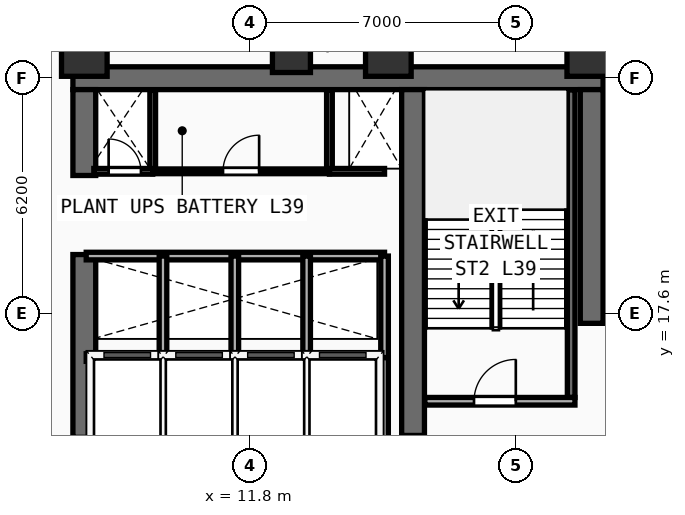
"""IFC4 building model, lengths in metres.
Left out: names, types, materials, properties, quantities, classifications, styles, units other than length and angle.
Written with IfcOpenShell. Run it as: python <this file> out.ifc"""

import sys

from ifc_helpers import new_model, si_unit, direction, frame, frame_2d, origin, origin_2d, place, context, subcontext, project, spatial, rectangle, extrude, element, fill, save


model = new_model("IFC4")
c1 = context("Model", 3, precision=1e-05, world=origin(), true_north=direction((0.0, 1.0)))
c2 = subcontext(c1, "Body", "Model", "MODEL_VIEW")
j1 = project(units=[si_unit("LENGTHUNIT", "METRE"), si_unit("PLANEANGLEUNIT", "RADIAN")], contexts=[c1])
p1 = place(None, origin())
s1 = spatial("IfcSite", under=j1, at=p1, CompositionType="ELEMENT")
p2 = place(p1, origin())
s2 = spatial("IfcBuilding", under=s1, at=p2, CompositionType="ELEMENT")
p3 = place(p2, frame((0.0, 0.0, 153.8)))
s3 = spatial("IfcBuildingStorey", under=s2, at=p3, CompositionType="ELEMENT", Elevation=153.8)
p4 = place(p3, frame((7.15, 23.8, 0.0), z_axis=(0.0, 0.0, 1.0), x_axis=(1.0, 0.0, 0.0)))
e1 = element("IfcWall", 1, at=p4, inside=s3, PredefinedType="SHEAR", context=c2, shape_type="SweptSolid", body=[
    extrude(rectangle(XDim=13.95, YDim=0.6, at=frame_2d((6.975, 0.0))), origin(), (0.0, 0.0, 1.0), 3.56),
])
p5 = place(p3, frame((7.45, 14.35, 0.0), z_axis=(0.0, 0.0, 1.0), x_axis=(0.0, 1.0, 0.0)))
e2 = element("IfcWall", 2, at=p5, inside=s3, PredefinedType="SHEAR", context=c2, shape_type="SweptSolid", body=[
    extrude(rectangle(XDim=4.81, YDim=0.6, at=frame_2d((2.405, 0.0))), origin(), (0.0, 0.0, 1.0), 3.56),
])
p6 = place(p3, frame((7.45, 21.24, 0.0), z_axis=(0.0, 0.0, 1.0), x_axis=(0.0, 1.0, 0.0)))
e3 = element("IfcWall", 3, at=p6, inside=s3, PredefinedType="SHEAR", context=c2, shape_type="SweptSolid", body=[
    extrude(rectangle(XDim=2.26, YDim=0.6, at=frame_2d((1.13, 0.0))), origin(), (0.0, 0.0, 1.0), 3.56),
])
p7 = place(p3, frame((20.8, 17.35, 0.0), z_axis=(0.0, 0.0, 1.0), x_axis=(0.0, 1.0, 0.0)))
e4 = element("IfcWall", 4, at=p7, inside=s3, PredefinedType="SHEAR", context=c2, shape_type="SweptSolid", body=[
    extrude(rectangle(XDim=6.15, YDim=0.6, at=frame_2d((3.075, 0.0))), origin(), (0.0, 0.0, 1.0), 3.56),
])
p8 = place(p3, frame((16.1, 14.4, 0.0), z_axis=(0.0, 0.0, 1.0), x_axis=(0.0, 1.0, 0.0)))
e5 = element("IfcWall", 5, at=p8, inside=s3, PredefinedType="SHEAR", context=c2, shape_type="SweptSolid", body=[
    extrude(rectangle(XDim=9.1, YDim=0.6, at=frame_2d((4.55, 0.0))), origin(), (0.0, 0.0, 1.0), 3.56),
])
for number, where, z_axis, x_axis in (
    (6, (7.45, 24.45, 0.0), (0.0, 0.0, 1.0), (1.0, 0.0, 0.0)),
    (7, (15.45, 24.45, 0.0), (0.0, 0.0, 1.0), (1.0, 0.0, 0.0)),
    (8, (20.75, 24.45, 0.0), (0.0, 0.0, 1.0), (1.0, 0.0, 0.0)),
):
    element("IfcColumn", number, at=place(p3, frame(where, z_axis=z_axis, x_axis=x_axis)), inside=s3, PredefinedType="COLUMN", context=c2, shape_type="SweptSolid", body=[
        extrude(rectangle(XDim=1.2, YDim=1.2, at=origin_2d()), origin(), (0.0, 0.0, 1.0), 3.56),
    ])
p9 = place(p3, frame((12.9, 24.45, 0.0), z_axis=(0.0, 0.0, 1.0), x_axis=(1.0, 0.0, 0.0)))
e9 = element("IfcColumn", 9, at=p9, inside=s3, PredefinedType="COLUMN", context=c2, shape_type="SweptSolid", body=[
    extrude(rectangle(XDim=1.0, YDim=1.0, at=origin_2d()), origin(), (0.0, 0.0, 1.0), 3.56),
])
p10 = place(p3, frame((20.26, 15.4, 0.0), z_axis=(0.0, 0.0, 1.0), x_axis=(0.0, 1.0, 0.0)))
e10 = element("IfcWall", 10, at=p10, inside=s3, PredefinedType="SHEAR", context=c2, shape_type="SweptSolid", body=[
    extrude(rectangle(XDim=8.09, YDim=0.2, at=frame_2d((4.045, 0.0))), origin(), (0.0, 0.0, 1.0), 3.56),
])
p11 = place(p3, frame((16.41, 15.3, 0.0), z_axis=(0.0, 0.0, 1.0), x_axis=(1.0, 0.0, 0.0)))
e11 = element("IfcWall", 11, at=p11, inside=s3, PredefinedType="PARTITIONING", context=c2, shape_type="SweptSolid", body=[
    extrude(rectangle(XDim=3.95, YDim=0.2, at=frame_2d((1.975, 0.0))), origin(), (0.0, 0.0, 1.0), 3.56),
])
p12 = place(p11, frame((1.294, 0.0, 0.0)))
e12 = element("IfcOpeningElement", 12, at=p12, cuts=e11, PredefinedType="OPENING", context=c2, shape_type="SweptSolid", body=[
    extrude(rectangle(XDim=1.1, YDim=2.2, at=frame_2d((0.55, 1.1))), frame((0.0, 0.11, 0.0), z_axis=(0.0, -1.0, 0.0), x_axis=(1.0, 0.0, 0.0)), (0.0, 0.0, 1.0), 0.22),
])
p13 = place(p3, frame((7.5, 16.45, 0.0), z_axis=(0.0, 0.0, 1.0), x_axis=(1.0, 0.0, 0.0)))
e13 = element("IfcWall", 13, at=p13, inside=s3, PredefinedType="PARTITIONING", context=c2, shape_type="SweptSolid", body=[
    extrude(rectangle(XDim=7.85, YDim=0.2, at=frame_2d((3.925, 0.0))), origin(), (0.0, 0.0, 1.0), 3.56),
])
for number, where, z_axis, x_axis in (
    (14, (15.35, 14.22, 0.0), (0.0, 0.0, 1.0), (0.0, 1.0, 0.0)),
    (15, (9.52, 14.22, 0.0), (0.0, 0.0, 1.0), (0.0, 1.0, 0.0)),
    (16, (11.41, 14.22, 0.0), (0.0, 0.0, 1.0), (0.0, 1.0, 0.0)),
    (17, (13.3, 14.22, 0.0), (0.0, 0.0, 1.0), (0.0, 1.0, 0.0)),
):
    element("IfcWall", number, at=place(p3, frame(where, z_axis=z_axis, x_axis=x_axis)), inside=s3, PredefinedType="PARTITIONING", context=c2, shape_type="SweptSolid", body=[
        extrude(rectangle(XDim=2.23, YDim=0.2, at=frame_2d((1.115, 0.0))), origin(), (0.0, 0.0, 1.0), 3.56),
    ])
p14 = place(p3, frame((7.5, 19.12, 0.0), z_axis=(0.0, 0.0, 1.0), x_axis=(1.0, 0.0, 0.0)))
e18 = element("IfcWall", 18, at=p14, inside=s3, PredefinedType="PARTITIONING", context=c2, shape_type="SweptSolid", body=[
    extrude(rectangle(XDim=7.85, YDim=0.2, at=frame_2d((3.925, 0.0))), origin(), (0.0, 0.0, 1.0), 3.56),
])
for number, where, z_axis, x_axis in (
    (19, (15.35, 16.45, 0.0), (0.0, 0.0, 1.0), (0.0, 1.0, 0.0)),
    (20, (9.52, 16.45, 0.0), (0.0, 0.0, 1.0), (0.0, 1.0, 0.0)),
    (21, (11.41, 16.45, 0.0), (0.0, 0.0, 1.0), (0.0, 1.0, 0.0)),
    (22, (13.3, 16.45, 0.0), (0.0, 0.0, 1.0), (0.0, 1.0, 0.0)),
):
    element("IfcWall", number, at=place(p3, frame(where, z_axis=z_axis, x_axis=x_axis)), inside=s3, PredefinedType="PARTITIONING", context=c2, shape_type="SweptSolid", body=[
        extrude(rectangle(XDim=2.67, YDim=0.2, at=frame_2d((1.335, 0.0))), origin(), (0.0, 0.0, 1.0), 3.56),
    ])
for number, where, z_axis, x_axis in (
    (23, (9.25, 21.35, 0.0), (0.0, 0.0, 1.0), (0.0, 1.0, 0.0)),
    (24, (13.9, 21.35, 0.0), (0.0, 0.0, 1.0), (0.0, 1.0, 0.0)),
):
    element("IfcWall", number, at=place(p3, frame(where, z_axis=z_axis, x_axis=x_axis)), inside=s3, PredefinedType="PARTITIONING", context=c2, shape_type="SweptSolid", body=[
        extrude(rectangle(XDim=2.13, YDim=0.15, at=frame_2d((1.065, 0.0))), origin(), (0.0, 0.0, 1.0), 3.56),
    ])
p15 = place(p3, frame((7.7, 21.35, 0.0), z_axis=(0.0, 0.0, 1.0), x_axis=(1.0, 0.0, 0.0)))
e25 = element("IfcWall", 25, at=p15, inside=s3, PredefinedType="PARTITIONING", context=c2, shape_type="SweptSolid", body=[
    extrude(rectangle(XDim=1.55, YDim=0.15, at=frame_2d((0.775, 0.0))), origin(), (0.0, 0.0, 1.0), 3.56),
])
p16 = place(p15, frame((0.39, 0.0, 0.0)))
e26 = element("IfcOpeningElement", 26, at=p16, cuts=e25, PredefinedType="OPENING", context=c2, shape_type="SweptSolid", body=[
    extrude(rectangle(XDim=0.85, YDim=2.15, at=frame_2d((0.425, 1.075))), frame((0.0, 0.085, 0.0), z_axis=(0.0, -1.0, 0.0), x_axis=(1.0, 0.0, 0.0)), (0.0, 0.0, 1.0), 0.17),
])
p17 = place(p3, frame((13.9, 21.35, 0.0), z_axis=(0.0, 0.0, 1.0), x_axis=(1.0, 0.0, 0.0)))
e27 = element("IfcWall", 27, at=p17, inside=s3, PredefinedType="PARTITIONING", context=c2, shape_type="SweptSolid", body=[
    extrude(rectangle(XDim=1.45, YDim=0.15, at=frame_2d((0.725, 0.0))), origin(), (0.0, 0.0, 1.0), 3.56),
])
p18 = place(p3, frame((9.25, 21.35, 0.0), z_axis=(0.0, 0.0, 1.0), x_axis=(1.0, 0.0, 0.0)))
e28 = element("IfcWall", 28, at=p18, inside=s3, PredefinedType="PARTITIONING", context=c2, shape_type="SweptSolid", body=[
    extrude(rectangle(XDim=4.65, YDim=0.125, at=frame_2d((2.325, 0.0))), origin(), (0.0, 0.0, 1.0), 3.56),
])
p19 = place(p18, frame((1.85, 0.0, 0.0)))
e29 = element("IfcOpeningElement", 29, at=p19, cuts=e28, PredefinedType="OPENING", context=c2, shape_type="SweptSolid", body=[
    extrude(rectangle(XDim=0.95, YDim=2.15, at=frame_2d((0.475, 1.075))), frame((0.0, 0.073, 0.0), z_axis=(0.0, -1.0, 0.0), x_axis=(1.0, 0.0, 0.0)), (0.0, 0.0, 1.0), 0.145),
])
p20 = place(p12, origin())
e30 = element("IfcDoor", 30, at=p20, inside=s3, OperationType="SINGLE_SWING_RIGHT", PredefinedType="DOOR", context=c2, shape_type="SweptSolid", body=[
    extrude(rectangle(XDim=1.1, YDim=2.2, at=frame_2d((0.55, 1.1))), frame((0.0, 0.025, 0.0), z_axis=(0.0, -1.0, 0.0), x_axis=(1.0, 0.0, 0.0)), (0.0, 0.0, 1.0), 0.05),
])
fill(e12, e30)
p21 = place(p16, origin())
e31 = element("IfcDoor", 31, at=p21, inside=s3, OperationType="SINGLE_SWING_LEFT", PredefinedType="DOOR", context=c2, shape_type="SweptSolid", body=[
    extrude(rectangle(XDim=0.85, YDim=2.15, at=frame_2d((0.425, 1.075))), frame((0.0, 0.025, 0.0), z_axis=(0.0, -1.0, 0.0), x_axis=(1.0, 0.0, 0.0)), (0.0, 0.0, 1.0), 0.05),
])
fill(e26, e31)
p22 = place(p19, origin())
e32 = element("IfcDoor", 32, at=p22, inside=s3, OperationType="SINGLE_SWING_RIGHT", PredefinedType="DOOR", context=c2, shape_type="SweptSolid", body=[
    extrude(rectangle(XDim=0.95, YDim=2.15, at=frame_2d((0.475, 1.075))), frame((0.0, 0.025, 0.0), z_axis=(0.0, -1.0, 0.0), x_axis=(1.0, 0.0, 0.0)), (0.0, 0.0, 1.0), 0.05),
])
fill(e29, e32)
save(model, sys.argv[1])
